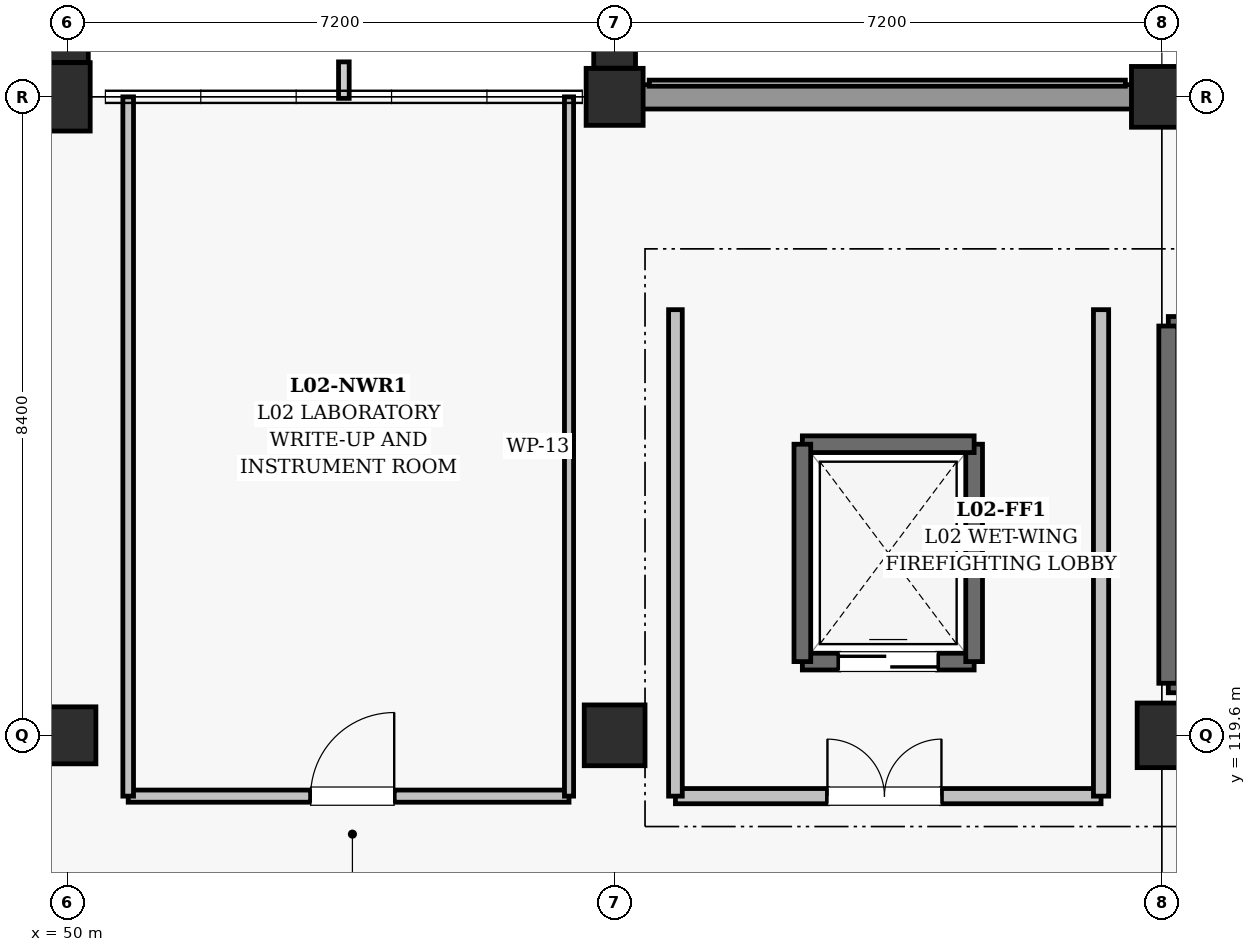
"""IFC4 building model, lengths in metres.
Left out: names, types, materials, properties, quantities, classifications, styles, units other than length and angle.
Written with IfcOpenShell. Run it as: python <this file> out.ifc"""

import sys

from ifc_helpers import new_model, si_unit, direction, frame, frame_2d, origin, origin_2d, place, context, subcontext, project, spatial, rectangle, extrude, element, fill, save


model = new_model("IFC4")
c1 = context("Model", 3, precision=1e-05, world=origin(), true_north=direction((0.0, 1.0)))
c2 = subcontext(c1, "Body", "Model", "MODEL_VIEW")
j1 = project(units=[si_unit("LENGTHUNIT", "METRE"), si_unit("PLANEANGLEUNIT", "RADIAN")], contexts=[c1])
p1 = place(None, origin())
s1 = spatial("IfcSite", under=j1, at=p1, CompositionType="ELEMENT")
p2 = place(p1, origin())
s2 = spatial("IfcBuilding", under=s1, at=p2, CompositionType="ELEMENT")
p3 = place(p2, frame((0.0, 0.0, 9.9)))
s3 = spatial("IfcBuildingStorey", under=s2, at=p3, CompositionType="ELEMENT", Elevation=9.9)
p4 = place(p3, frame((50.0, 119.6, 0.0), z_axis=(0.0, 0.0, 1.0), x_axis=(1.0, 0.0, 0.0)))
e1 = element("IfcColumn", 1, at=p4, inside=s3, PredefinedType="COLUMN", context=c2, shape_type="SweptSolid", body=[
    extrude(rectangle(XDim=0.75, YDim=0.75, at=origin_2d()), origin(), (0.0, 0.0, 1.0), 4.5),
])
p5 = place(p3, frame((50.0, 128.0, 0.0), z_axis=(0.0, 0.0, 1.0), x_axis=(1.0, 0.0, 0.0)))
e2 = element("IfcColumn", 2, at=p5, inside=s3, PredefinedType="COLUMN", context=c2, shape_type="SweptSolid", body=[
    extrude(rectangle(XDim=0.6, YDim=0.9, at=origin_2d()), origin(), (0.0, 0.0, 1.0), 4.5),
])
p6 = place(p3, frame((57.2, 119.6, 0.0), z_axis=(0.0, 0.0, 1.0), x_axis=(1.0, 0.0, 0.0)))
e3 = element("IfcColumn", 3, at=p6, inside=s3, PredefinedType="COLUMN", context=c2, shape_type="SweptSolid", body=[
    extrude(rectangle(XDim=0.8, YDim=0.8, at=origin_2d()), origin(), (0.0, 0.0, 1.0), 4.5),
])
p7 = place(p3, frame((57.2, 128.0, 0.0), z_axis=(0.0, 0.0, 1.0), x_axis=(1.0, 0.0, 0.0)))
e4 = element("IfcColumn", 4, at=p7, inside=s3, PredefinedType="COLUMN", context=c2, shape_type="SweptSolid", body=[
    extrude(rectangle(XDim=0.75, YDim=0.75, at=origin_2d()), origin(), (0.0, 0.0, 1.0), 4.5),
])
p8 = place(p3, frame((64.4, 119.6, 0.0), z_axis=(0.0, 0.0, 1.0), x_axis=(1.0, 0.0, 0.0)))
e5 = element("IfcColumn", 5, at=p8, inside=s3, PredefinedType="COLUMN", context=c2, shape_type="SweptSolid", body=[
    extrude(rectangle(XDim=0.65, YDim=0.85, at=origin_2d()), origin(), (0.0, 0.0, 1.0), 4.5),
])
p9 = place(p3, frame((64.4, 128.0, 0.0), z_axis=(0.0, 0.0, 1.0), x_axis=(1.0, 0.0, 0.0)))
e6 = element("IfcColumn", 6, at=p9, inside=s3, PredefinedType="COLUMN", context=c2, shape_type="SweptSolid", body=[
    extrude(rectangle(XDim=0.8, YDim=0.8, at=origin_2d()), origin(), (0.0, 0.0, 1.0), 4.5),
])
for number, where, z_axis, x_axis in (
    (7, (50.0, 128.853, 0.0), (0.0, 0.0, 1.0), (1.0, 0.0, 0.0)),
    (8, (57.2, 128.778, 0.0), (0.0, 0.0, 1.0), (1.0, 0.0, 0.0)),
):
    element("IfcColumn", number, at=place(p3, frame(where, z_axis=z_axis, x_axis=x_axis)), inside=s3, PredefinedType="PILASTER", context=c2, shape_type="SweptSolid", body=[
        extrude(rectangle(XDim=0.55, YDim=0.8, at=origin_2d()), origin(), (0.0, 0.0, 1.0), 4.5),
    ])
p10 = place(p3, frame((57.555, 128.0, 0.0), z_axis=(0.0, 0.0, 1.0), x_axis=(1.0, 0.0, 0.0)))
e9 = element("IfcWall", 9, at=p10, inside=s3, PredefinedType="SOLIDWALL", context=c2, shape_type="SweptSolid", body=[
    extrude(rectangle(XDim=6.465, YDim=0.32, at=frame_2d((3.232, 0.0))), origin(), (0.0, 0.0, 1.0), 3.305),
])
p11 = place(p3, frame((64.485, 120.285, 0.0), z_axis=(0.0, 0.0, 1.0), x_axis=(1.0, 0.0, 0.0)))
e10 = element("IfcWall", 10, at=p11, inside=s3, PredefinedType="SHEAR", context=c2, shape_type="SweptSolid", body=[
    extrude(rectangle(XDim=10.63, YDim=0.25, at=frame_2d((5.315, 0.0))), origin(), (0.0, 0.0, 1.0), 4.175),
])
p12 = place(p11, frame((0.55, 0.0, 0.0)))
e11 = element("IfcOpeningElement", 11, at=p12, cuts=e10, PredefinedType="OPENING", context=c2, shape_type="SweptSolid", body=[
    extrude(rectangle(XDim=1.2, YDim=2.15, at=frame_2d((0.6, 1.075))), frame((0.0, 0.135, 0.0), z_axis=(0.0, -1.0, 0.0), x_axis=(1.0, 0.0, 0.0)), (0.0, 0.0, 1.0), 0.27),
])
p13 = place(p3, frame((75.115, 124.985, 0.0), z_axis=(0.0, 0.0, 1.0), x_axis=(-1.0, 0.0, 0.0)))
e12 = element("IfcWall", 12, at=p13, inside=s3, PredefinedType="SHEAR", context=c2, shape_type="SweptSolid", body=[
    extrude(rectangle(XDim=10.63, YDim=0.25, at=frame_2d((5.315, 0.0))), origin(), (0.0, 0.0, 1.0), 4.175),
])
p14 = place(p3, frame((64.485, 124.985, 0.0), z_axis=(0.0, 0.0, 1.0), x_axis=(0.0, -1.0, 0.0)))
e13 = element("IfcWall", 13, at=p14, inside=s3, PredefinedType="SHEAR", context=c2, shape_type="SweptSolid", body=[
    extrude(rectangle(XDim=4.7, YDim=0.25, at=frame_2d((2.35, 0.0))), origin(), (0.0, 0.0, 1.0), 4.175),
])
p15 = place(p3, frame((59.67, 120.57, 0.0), z_axis=(0.0, 0.0, 1.0), x_axis=(1.0, 0.0, 0.0)))
e14 = element("IfcWall", 14, at=p15, inside=s3, PredefinedType="SHEAR", context=c2, shape_type="SweptSolid", body=[
    extrude(rectangle(XDim=2.26, YDim=0.22, at=frame_2d((1.13, 0.0))), origin(), (0.0, 0.0, 1.0), 4.175),
])
p16 = place(p15, frame((0.48, 0.0, 0.0)))
e15 = element("IfcOpeningElement", 15, at=p16, cuts=e14, PredefinedType="OPENING", context=c2, shape_type="SweptSolid", body=[
    extrude(rectangle(XDim=1.3, YDim=2.2, at=frame_2d((0.65, 1.1))), frame((0.0, 0.12, 0.0), z_axis=(0.0, -1.0, 0.0), x_axis=(1.0, 0.0, 0.0)), (0.0, 0.0, 1.0), 0.24),
])
p17 = place(p3, frame((61.93, 120.57, 0.0), z_axis=(0.0, 0.0, 1.0), x_axis=(0.0, 1.0, 0.0)))
e16 = element("IfcWall", 16, at=p17, inside=s3, PredefinedType="SHEAR", context=c2, shape_type="SweptSolid", body=[
    extrude(rectangle(XDim=2.86, YDim=0.22, at=frame_2d((1.43, 0.0))), origin(), (0.0, 0.0, 1.0), 4.175),
])
p18 = place(p3, frame((61.93, 123.43, 0.0), z_axis=(0.0, 0.0, 1.0), x_axis=(-1.0, 0.0, 0.0)))
e17 = element("IfcWall", 17, at=p18, inside=s3, PredefinedType="SHEAR", context=c2, shape_type="SweptSolid", body=[
    extrude(rectangle(XDim=2.26, YDim=0.22, at=frame_2d((1.13, 0.0))), origin(), (0.0, 0.0, 1.0), 4.175),
])
p19 = place(p3, frame((59.67, 123.43, 0.0), z_axis=(0.0, 0.0, 1.0), x_axis=(0.0, -1.0, 0.0)))
e18 = element("IfcWall", 18, at=p19, inside=s3, PredefinedType="SHEAR", context=c2, shape_type="SweptSolid", body=[
    extrude(rectangle(XDim=2.86, YDim=0.22, at=frame_2d((1.43, 0.0))), origin(), (0.0, 0.0, 1.0), 4.175),
])
p20 = place(p3, frame((58.0, 118.8, 0.0), z_axis=(0.0, 0.0, 1.0), x_axis=(1.0, 0.0, 0.0)))
e19 = element("IfcWall", 19, at=p20, inside=s3, PredefinedType="SOLIDWALL", context=c2, shape_type="SweptSolid", body=[
    extrude(rectangle(XDim=5.6, YDim=0.2, at=frame_2d((2.8, 0.0))), origin(), (0.0, 0.0, 1.0), 3.54),
])
p21 = place(p20, frame((2.0, 0.0, 0.0)))
e20 = element("IfcOpeningElement", 20, at=p21, cuts=e19, PredefinedType="OPENING", context=c2, shape_type="SweptSolid", body=[
    extrude(rectangle(XDim=1.5, YDim=2.2, at=frame_2d((0.75, 1.1))), frame((0.0, 0.11, 0.0), z_axis=(0.0, -1.0, 0.0), x_axis=(1.0, 0.0, 0.0)), (0.0, 0.0, 1.0), 0.22),
])
p22 = place(p3, frame((58.0, 118.8, 0.0), z_axis=(0.0, 0.0, 1.0), x_axis=(0.0, 1.0, 0.0)))
e21 = element("IfcWall", 21, at=p22, inside=s3, PredefinedType="SOLIDWALL", context=c2, shape_type="SweptSolid", body=[
    extrude(rectangle(XDim=6.4, YDim=0.18, at=frame_2d((3.2, 0.0))), origin(), (0.0, 0.0, 1.0), 3.36),
])
p23 = place(p3, frame((63.6, 118.8, 0.0), z_axis=(0.0, 0.0, 1.0), x_axis=(0.0, 1.0, 0.0)))
e22 = element("IfcWall", 22, at=p23, inside=s3, PredefinedType="SOLIDWALL", context=c2, shape_type="SweptSolid", body=[
    extrude(rectangle(XDim=6.4, YDim=0.2, at=frame_2d((3.2, 0.0))), origin(), (0.0, 0.0, 1.0), 3.36),
])
p24 = place(p3, frame((50.8, 118.8, 0.0), z_axis=(0.0, 0.0, 1.0), x_axis=(1.0, 0.0, 0.0)))
e23 = element("IfcWall", 23, at=p24, inside=s3, PredefinedType="PARTITIONING", context=c2, shape_type="SweptSolid", body=[
    extrude(rectangle(XDim=5.8, YDim=0.16, at=frame_2d((2.9, 0.0))), origin(), (0.0, 0.0, 1.0), 3.54),
])
p25 = place(p24, frame((2.4, 0.0, 0.0)))
e24 = element("IfcOpeningElement", 24, at=p25, cuts=e23, PredefinedType="OPENING", context=c2, shape_type="SweptSolid", body=[
    extrude(rectangle(XDim=1.1, YDim=2.15, at=frame_2d((0.55, 1.075))), frame((0.0, 0.09, 0.0), z_axis=(0.0, -1.0, 0.0), x_axis=(1.0, 0.0, 0.0)), (0.0, 0.0, 1.0), 0.18),
])
p26 = place(p3, frame((50.8, 118.8, 0.0), z_axis=(0.0, 0.0, 1.0), x_axis=(0.0, 1.0, 0.0)))
e25 = element("IfcWall", 25, at=p26, inside=s3, PredefinedType="PARTITIONING", context=c2, shape_type="SweptSolid", body=[
    extrude(rectangle(XDim=9.2, YDim=0.14, at=frame_2d((4.6, 0.0))), origin(), (0.0, 0.0, 1.0), 3.41),
])
p27 = place(p3, frame((56.6, 118.8, 0.0), z_axis=(0.0, 0.0, 1.0), x_axis=(0.0, 1.0, 0.0)))
e26 = element("IfcWall", 26, at=p27, inside=s3, PredefinedType="PARTITIONING", context=c2, shape_type="SweptSolid", body=[
    extrude(rectangle(XDim=9.2, YDim=0.12, at=frame_2d((4.6, 0.0))), origin(), (0.0, 0.0, 1.0), 3.41),
])
p28 = place(p16, origin())
e27 = element("IfcDoor", 27, at=p28, inside=s3, OperationType="DOUBLE_DOOR_SLIDING", PredefinedType="DOOR", context=c2, shape_type="SweptSolid", body=[
    extrude(rectangle(XDim=1.3, YDim=2.2, at=frame_2d((0.65, 1.1))), frame((0.0, 0.025, 0.0), z_axis=(0.0, -1.0, 0.0), x_axis=(1.0, 0.0, 0.0)), (0.0, 0.0, 1.0), 0.05),
])
fill(e15, e27)
p29 = place(p21, origin())
e28 = element("IfcDoor", 28, at=p29, inside=s3, OperationType="DOUBLE_DOOR_SINGLE_SWING", PredefinedType="DOOR", context=c2, shape_type="SweptSolid", body=[
    extrude(rectangle(XDim=1.5, YDim=2.2, at=frame_2d((0.75, 1.1))), frame((0.0, 0.025, 0.0), z_axis=(0.0, -1.0, 0.0), x_axis=(1.0, 0.0, 0.0)), (0.0, 0.0, 1.0), 0.05),
])
fill(e20, e28)
p30 = place(p25, origin())
e29 = element("IfcDoor", 29, at=p30, inside=s3, OperationType="SINGLE_SWING_RIGHT", PredefinedType="DOOR", context=c2, shape_type="SweptSolid", body=[
    extrude(rectangle(XDim=1.1, YDim=2.15, at=frame_2d((0.55, 1.075))), frame((0.0, 0.025, 0.0), z_axis=(0.0, -1.0, 0.0), x_axis=(1.0, 0.0, 0.0)), (0.0, 0.0, 1.0), 0.05),
])
fill(e24, e29)
save(model, sys.argv[1])
